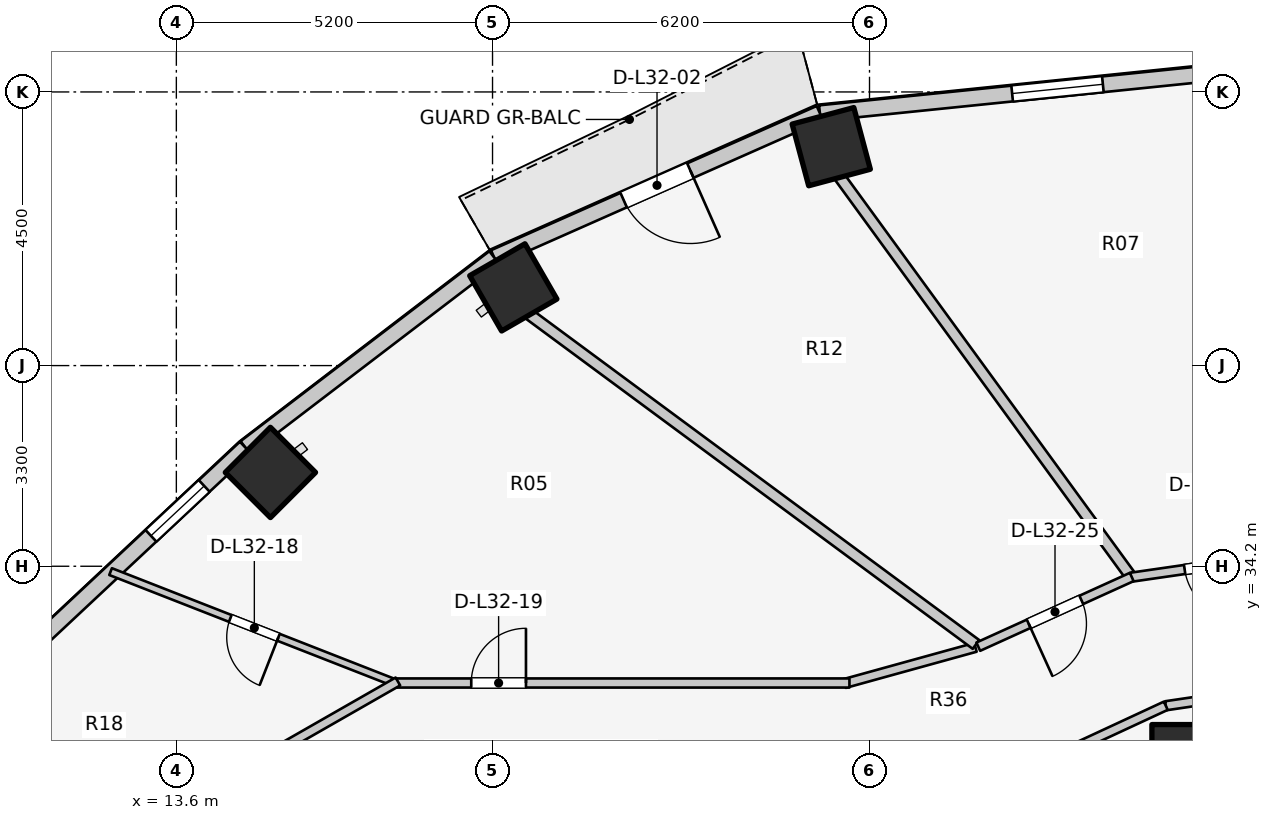
"""IFC4 building model, lengths in metres.
Left out: names, types, materials, properties, quantities, classifications, styles, units other than length and angle.
Written with IfcOpenShell. Run it as: python <this file> out.ifc"""

import sys

from ifc_helpers import new_model, si_unit, direction, frame, frame_2d, origin, origin_2d, place, context, subcontext, project, spatial, rectangle, extrude, element, fill, save


model = new_model("IFC4")
c1 = context("Model", 3, precision=1e-05, world=origin(), true_north=direction((0.0, 1.0)))
c2 = subcontext(c1, "Body", "Model", "MODEL_VIEW")
j1 = project(units=[si_unit("LENGTHUNIT", "METRE"), si_unit("PLANEANGLEUNIT", "RADIAN")], contexts=[c1])
p1 = place(None, origin())
s1 = spatial("IfcSite", under=j1, at=p1, CompositionType="ELEMENT")
p2 = place(p1, origin())
s2 = spatial("IfcBuilding", under=s1, at=p2, CompositionType="ELEMENT")
p3 = place(p2, frame((0.0, 0.0, 107.3)))
s3 = spatial("IfcBuildingStorey", under=s2, at=p3, CompositionType="ELEMENT", Elevation=107.3)
p4 = place(p3, frame((30.069, 31.172, 0.0), z_axis=(0.0, 0.0, 1.0), x_axis=(1.0, 0.0, 0.0)))
e1 = element("IfcColumn", 1, at=p4, inside=s3, PredefinedType="COLUMN", context=c2, shape_type="SweptSolid", body=[
    extrude(rectangle(XDim=0.85, YDim=0.85, at=origin_2d()), origin(), (0.0, 0.0, 1.0), 3.1),
])
for number, where, z_axis, x_axis in (
    (2, (24.371, 41.1, 0.0), (0.0, 0.0, 1.0), (-0.259, 0.966, 0.0)),
    (3, (19.142, 38.786, 0.0), (0.0, 0.0, 1.0), (-0.5, 0.866, 0.0)),
    (4, (15.147, 35.743, 0.0), (0.0, 0.0, 1.0), (-0.707, 0.707, 0.0)),
):
    element("IfcColumn", number, at=place(p3, frame(where, z_axis=z_axis, x_axis=x_axis)), inside=s3, PredefinedType="COLUMN", context=c2, shape_type="SweptSolid", body=[
        extrude(rectangle(XDim=1.05, YDim=1.05, at=origin_2d()), origin(), (0.0, 0.0, 1.0), 3.1),
    ])
p5 = place(p3, frame((32.0, 42.449, 0.0), z_axis=(0.0, 0.0, 1.0), x_axis=(-0.994821390558, -0.101638579726, 0.0)))
e5 = element("IfcWall", 5, at=p5, inside=s3, PredefinedType="STANDARD", context=c2, shape_type="SweptSolid", body=[
    extrude(rectangle(XDim=7.857, YDim=0.26, at=frame_2d((3.929, 0.0))), origin(), (0.0, 0.0, 1.0), 2.85),
])
p6 = place(p5, frame((3.178, 0.0, 0.75)))
e6 = element("IfcOpeningElement", 6, at=p6, cuts=e5, PredefinedType="OPENING", context=c2, shape_type="SweptSolid", body=[
    extrude(rectangle(XDim=1.5, YDim=1.6, at=frame_2d((0.75, 0.8))), frame((0.0, 0.14, 0.0), z_axis=(0.0, -1.0, 0.0), x_axis=(1.0, 0.0, 0.0)), (0.0, 0.0, 1.0), 0.28),
])
p7 = place(p3, frame((24.184, 41.651, 0.0), z_axis=(0.0, 0.0, 1.0), x_axis=(-0.914336605747, -0.404955023911, 0.0)))
e7 = element("IfcWall", 7, at=p7, inside=s3, PredefinedType="STANDARD", context=c2, shape_type="SweptSolid", body=[
    extrude(rectangle(XDim=5.859, YDim=0.26, at=frame_2d((2.929, 0.0))), origin(), (0.0, 0.0, 1.0), 2.88),
])
p8 = place(p7, frame((2.329, 0.0, 0.0)))
e8 = element("IfcOpeningElement", 8, at=p8, cuts=e7, PredefinedType="OPENING", context=c2, shape_type="SweptSolid", body=[
    extrude(rectangle(XDim=1.2, YDim=2.2, at=frame_2d((0.6, 1.1))), frame((0.0, 0.14, 0.0), z_axis=(0.0, -1.0, 0.0), x_axis=(1.0, 0.0, 0.0)), (0.0, 0.0, 1.0), 0.28),
])
p9 = place(p3, frame((18.827, 39.278, 0.0), z_axis=(0.0, 0.0, 1.0), x_axis=(-0.794809810864, -0.606858603427, 0.0)))
e9 = element("IfcWall", 9, at=p9, inside=s3, PredefinedType="STANDARD", context=c2, shape_type="SweptSolid", body=[
    extrude(rectangle(XDim=5.149, YDim=0.26, at=frame_2d((2.575, 0.0))), origin(), (0.0, 0.0, 1.0), 2.85),
])
p10 = place(p3, frame((14.734, 36.153, 0.0), z_axis=(0.0, 0.0, 1.0), x_axis=(-0.730162452258, -0.68327358599, 0.0)))
e10 = element("IfcWall", 10, at=p10, inside=s3, PredefinedType="STANDARD", context=c2, shape_type="SweptSolid", body=[
    extrude(rectangle(XDim=4.868, YDim=0.26, at=frame_2d((2.434, 0.0))), origin(), (0.0, 0.0, 1.0), 2.85),
])
p11 = place(p10, frame((0.926, 0.0, 0.75)))
e11 = element("IfcOpeningElement", 11, at=p11, cuts=e10, PredefinedType="OPENING", context=c2, shape_type="SweptSolid", body=[
    extrude(rectangle(XDim=1.2, YDim=1.5, at=frame_2d((0.6, 0.75))), frame((0.0, 0.14, 0.0), z_axis=(0.0, -1.0, 0.0), x_axis=(1.0, 0.0, 0.0)), (0.0, 0.0, 1.0), 0.28),
])
p12 = place(p3, frame((32.0, 32.22, 0.0), z_axis=(0.0, 0.0, 1.0), x_axis=(-0.989268584896, -0.146108408166, 0.0)))
e12 = element("IfcWall", 12, at=p12, inside=s3, PredefinedType="PARTITIONING", context=c2, shape_type="SweptSolid", body=[
    extrude(rectangle(XDim=2.151, YDim=0.15, at=frame_2d((1.075, 0.0))), origin(), (0.0, 0.0, 1.0), 2.272),
])
p13 = place(p3, frame((29.873, 31.906, 0.0), z_axis=(0.0, 0.0, 1.0), x_axis=(-0.906943449489, -0.421252393975, 0.0)))
e13 = element("IfcWall", 13, at=p13, inside=s3, PredefinedType="PARTITIONING", context=c2, shape_type="SweptSolid", body=[
    extrude(rectangle(XDim=2.186, YDim=0.15, at=frame_2d((1.093, 0.0))), origin(), (0.0, 0.0, 1.0), 2.272),
])
p14 = place(p3, frame((17.247, 32.262, 0.0), z_axis=(0.0, 0.0, 1.0), x_axis=(-0.931226461187, 0.364441048711, 0.0)))
e14 = element("IfcWall", 14, at=p14, inside=s3, PredefinedType="MOVABLE", context=c2, shape_type="SweptSolid", body=[
    extrude(rectangle(XDim=5.077, YDim=0.12, at=frame_2d((2.539, 0.0))), origin(), (0.0, 0.0, 1.0), 2.142),
])
p15 = place(p14, frame((2.114, 0.0, 0.0)))
e15 = element("IfcOpeningElement", 15, at=p15, cuts=e14, PredefinedType="OPENING", context=c2, shape_type="SweptSolid", body=[
    extrude(rectangle(XDim=0.85, YDim=2.05, at=frame_2d((0.425, 1.025))), frame((0.0, 0.07, 0.0), z_axis=(0.0, -1.0, 0.0), x_axis=(1.0, 0.0, 0.0)), (0.0, 0.0, 1.0), 0.14),
])
p16 = place(p3, frame((26.742, 32.867, 0.0), z_axis=(0.0, 0.0, 1.0), x_axis=(-0.963833843713, -0.266503886865, 0.0)))
e16 = element("IfcWall", 16, at=p16, inside=s3, PredefinedType="PARTITIONING", context=c2, shape_type="SweptSolid", body=[
    extrude(rectangle(XDim=2.232, YDim=0.15, at=frame_2d((1.116, 0.0))), origin(), (0.0, 0.0, 1.0), 2.272),
])
p17 = place(p3, frame((17.15, 32.28, 0.0), z_axis=(0.0, 0.0, 1.0), x_axis=(1.0, 0.0, 0.0)))
e17 = element("IfcWall", 17, at=p17, inside=s3, PredefinedType="PARTITIONING", context=c2, shape_type="SweptSolid", body=[
    extrude(rectangle(XDim=7.52, YDim=0.15, at=frame_2d((3.76, 0.0))), origin(), (0.0, 0.0, 1.0), 2.272),
])
p18 = place(p17, frame((1.3, 0.0, 0.0)))
e18 = element("IfcOpeningElement", 18, at=p18, cuts=e17, PredefinedType="OPENING", context=c2, shape_type="SweptSolid", body=[
    extrude(rectangle(XDim=0.9, YDim=2.1, at=frame_2d((0.45, 1.05))), frame((0.0, 0.085, 0.0), z_axis=(0.0, -1.0, 0.0), x_axis=(1.0, 0.0, 0.0)), (0.0, 0.0, 1.0), 0.17),
])
p19 = place(p3, frame((17.243, 32.305, 0.0), z_axis=(0.0, 0.0, 1.0), x_axis=(-0.867991349648, -0.496579315857, 0.0)))
e19 = element("IfcWall", 19, at=p19, inside=s3, PredefinedType="PARTITIONING", context=c2, shape_type="SweptSolid", body=[
    extrude(rectangle(XDim=2.567, YDim=0.15, at=frame_2d((1.283, 0.0))), origin(), (0.0, 0.0, 1.0), 2.142),
])
p20 = place(p3, frame((29.273, 34.066, 0.0), z_axis=(0.0, 0.0, 1.0), x_axis=(-0.589042211476, 0.808102266486, 0.0)))
e20 = element("IfcWall", 20, at=p20, inside=s3, PredefinedType="PARTITIONING", context=c2, shape_type="SweptSolid", body=[
    extrude(rectangle(XDim=8.101, YDim=0.18, at=frame_2d((4.051, 0.0))), origin(), (0.0, 0.0, 1.0), 2.272),
])
p21 = place(p3, frame((26.751, 32.914, 0.0), z_axis=(0.0, 0.0, 1.0), x_axis=(-0.80430981394, 0.594210167533, 0.0)))
e21 = element("IfcWall", 21, at=p21, inside=s3, PredefinedType="PARTITIONING", context=c2, shape_type="SweptSolid", body=[
    extrude(rectangle(XDim=9.146, YDim=0.18, at=frame_2d((4.573, 0.0))), origin(), (0.0, 0.0, 1.0), 2.272),
])
p22 = place(p3, frame((32.007, 34.41, 0.0), z_axis=(0.0, 0.0, 1.0), x_axis=(-0.989748682384, -0.142819976611, 0.0)))
e22 = element("IfcWall", 22, at=p22, inside=s3, PredefinedType="PARTITIONING", context=c2, shape_type="SweptSolid", body=[
    extrude(rectangle(XDim=2.737, YDim=0.15, at=frame_2d((1.368, 0.0))), origin(), (0.0, 0.0, 1.0), 2.272),
])
p23 = place(p22, frame((0.893, 0.0, 0.0)))
e23 = element("IfcOpeningElement", 23, at=p23, cuts=e22, PredefinedType="OPENING", context=c2, shape_type="SweptSolid", body=[
    extrude(rectangle(XDim=0.95, YDim=2.1, at=frame_2d((0.475, 1.05))), frame((0.0, 0.085, 0.0), z_axis=(0.0, -1.0, 0.0), x_axis=(1.0, 0.0, 0.0)), (0.0, 0.0, 1.0), 0.17),
])
p24 = place(p3, frame((29.313, 34.023, 0.0), z_axis=(0.0, 0.0, 1.0), x_axis=(-0.910568469686, -0.41335827319, 0.0)))
e24 = element("IfcWall", 24, at=p24, inside=s3, PredefinedType="PARTITIONING", context=c2, shape_type="SweptSolid", body=[
    extrude(rectangle(XDim=2.772, YDim=0.15, at=frame_2d((1.386, 0.0))), origin(), (0.0, 0.0, 1.0), 2.272),
])
p25 = place(p24, frame((0.911, 0.0, 0.0)))
e25 = element("IfcOpeningElement", 25, at=p25, cuts=e24, PredefinedType="OPENING", context=c2, shape_type="SweptSolid", body=[
    extrude(rectangle(XDim=0.95, YDim=2.1, at=frame_2d((0.475, 1.05))), frame((0.0, 0.085, 0.0), z_axis=(0.0, -1.0, 0.0), x_axis=(1.0, 0.0, 0.0)), (0.0, 0.0, 1.0), 0.17),
])
p26 = place(p6, origin())
e26 = element("IfcWindow", 26, at=p26, inside=s3, PartitioningType="SINGLE_PANEL", PredefinedType="WINDOW", context=c2, shape_type="SweptSolid", body=[
    extrude(rectangle(XDim=1.5, YDim=1.6, at=frame_2d((0.75, 0.8))), frame((0.0, 0.03, 0.0), z_axis=(0.0, -1.0, 0.0), x_axis=(1.0, 0.0, 0.0)), (0.0, 0.0, 1.0), 0.06),
])
fill(e6, e26)
p27 = place(p8, origin())
e27 = element("IfcDoor", 27, at=p27, inside=s3, OperationType="SINGLE_SWING_LEFT", PredefinedType="DOOR", context=c2, shape_type="SweptSolid", body=[
    extrude(rectangle(XDim=1.2, YDim=2.2, at=frame_2d((0.6, 1.1))), frame((0.0, 0.025, 0.0), z_axis=(0.0, -1.0, 0.0), x_axis=(1.0, 0.0, 0.0)), (0.0, 0.0, 1.0), 0.05),
])
fill(e8, e27)
p28 = place(p11, origin())
e28 = element("IfcWindow", 28, at=p28, inside=s3, PartitioningType="SINGLE_PANEL", PredefinedType="WINDOW", context=c2, shape_type="SweptSolid", body=[
    extrude(rectangle(XDim=1.2, YDim=1.5, at=frame_2d((0.6, 0.75))), frame((0.0, 0.03, 0.0), z_axis=(0.0, -1.0, 0.0), x_axis=(1.0, 0.0, 0.0)), (0.0, 0.0, 1.0), 0.06),
])
fill(e11, e28)
p29 = place(p15, origin())
e29 = element("IfcDoor", 29, at=p29, inside=s3, OperationType="SINGLE_SWING_LEFT", PredefinedType="DOOR", context=c2, shape_type="SweptSolid", body=[
    extrude(rectangle(XDim=0.85, YDim=2.05, at=frame_2d((0.425, 1.025))), frame((0.0, 0.025, 0.0), z_axis=(0.0, -1.0, 0.0), x_axis=(1.0, 0.0, 0.0)), (0.0, 0.0, 1.0), 0.05),
])
fill(e15, e29)
p30 = place(p18, origin())
e30 = element("IfcDoor", 30, at=p30, inside=s3, OperationType="SINGLE_SWING_RIGHT", PredefinedType="DOOR", context=c2, shape_type="SweptSolid", body=[
    extrude(rectangle(XDim=0.9, YDim=2.1, at=frame_2d((0.45, 1.05))), frame((0.0, 0.025, 0.0), z_axis=(0.0, -1.0, 0.0), x_axis=(1.0, 0.0, 0.0)), (0.0, 0.0, 1.0), 0.05),
])
fill(e18, e30)
p31 = place(p23, origin())
e31 = element("IfcDoor", 31, at=p31, inside=s3, OperationType="SINGLE_SWING_LEFT", PredefinedType="DOOR", context=c2, shape_type="SweptSolid", body=[
    extrude(rectangle(XDim=0.95, YDim=2.1, at=frame_2d((0.475, 1.05))), frame((0.0, 0.025, 0.0), z_axis=(0.0, -1.0, 0.0), x_axis=(1.0, 0.0, 0.0)), (0.0, 0.0, 1.0), 0.05),
])
fill(e23, e31)
p32 = place(p25, origin())
e32 = element("IfcDoor", 32, at=p32, inside=s3, OperationType="SINGLE_SWING_RIGHT", PredefinedType="DOOR", context=c2, shape_type="SweptSolid", body=[
    extrude(rectangle(XDim=0.95, YDim=2.1, at=frame_2d((0.475, 1.05))), frame((0.0, 0.025, 0.0), z_axis=(0.0, -1.0, 0.0), x_axis=(1.0, 0.0, 0.0)), (0.0, 0.0, 1.0), 0.05),
])
fill(e25, e32)
save(model, sys.argv[1])
